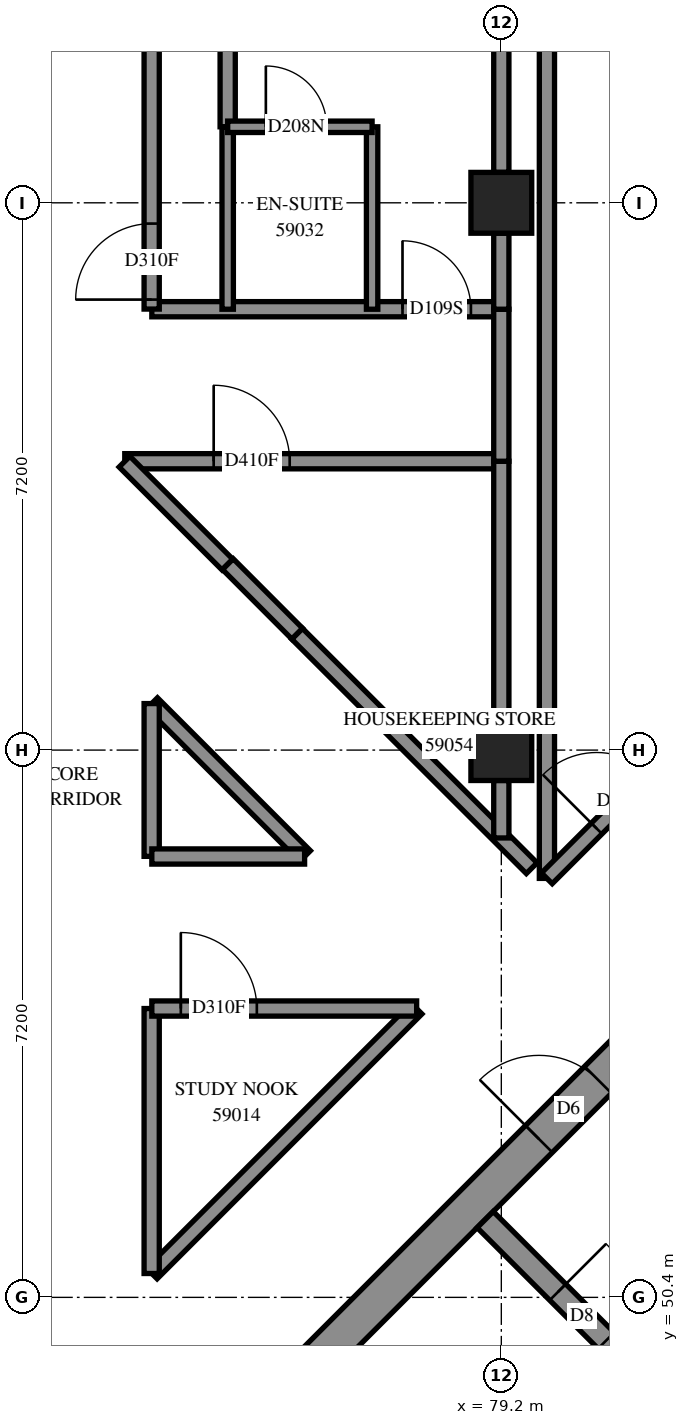
"""IFC4 building model, lengths in metres.
Left out: names, types, materials, properties, quantities, classifications, styles, units other than length and angle.
Written with IfcOpenShell. Run it as: python <this file> out.ifc"""

import sys

from ifc_helpers import new_model, si_unit, direction, frame, frame_2d, origin, origin_2d, place, context, subcontext, project, spatial, rectangle, extrude, element, fill, save


model = new_model("IFC4")
c1 = context("Model", 3, precision=1e-05, world=origin(), true_north=direction((0.0, 1.0)))
c2 = subcontext(c1, "Body", "Model", "MODEL_VIEW")
j1 = project(units=[si_unit("LENGTHUNIT", "METRE"), si_unit("PLANEANGLEUNIT", "RADIAN")], contexts=[c1])
p1 = place(None, origin())
s1 = spatial("IfcSite", under=j1, at=p1, CompositionType="ELEMENT")
p2 = place(p1, origin())
s2 = spatial("IfcBuilding", under=s1, at=p2, CompositionType="ELEMENT")
p3 = place(p2, frame((0.0, 0.0, 216.8)))
s3 = spatial("IfcBuildingStorey", under=s2, at=p3, CompositionType="ELEMENT", Elevation=216.8)
for number, where, z_axis, x_axis in (
    (1, (79.2, 57.6, 0.0), (0.0, 0.0, 1.0), (1.0, 0.0, 0.0)),
    (2, (79.2, 64.8, 0.0), (0.0, 0.0, 1.0), (1.0, 0.0, 0.0)),
):
    element("IfcColumn", number, at=place(p3, frame(where, z_axis=z_axis, x_axis=x_axis)), inside=s3, PredefinedType="COLUMN", context=c2, shape_type="SweptSolid", body=[
        extrude(rectangle(XDim=0.8, YDim=0.8, at=origin_2d()), origin(), (0.0, 0.0, 1.0), 3.1),
    ])
p4 = place(p3, frame((76.478, 49.267, -0.3), z_axis=(0.0, 0.0, 1.0), x_axis=(0.7071067812, 0.7071067812, 0.0)))
e3 = element("IfcWall", 3, at=p4, inside=s3, PredefinedType="SHEAR", context=c2, shape_type="SweptSolid", body=[
    extrude(rectangle(XDim=14.4, YDim=0.5, at=frame_2d((7.2, 0.0))), origin(), (0.0, 0.0, 1.0), 2.7),
])
p5 = place(p4, frame((4.55, 0.0, 0.3)))
e4 = element("IfcOpeningElement", 4, at=p5, cuts=e3, PredefinedType="OPENING", context=c2, shape_type="SweptSolid", body=[
    extrude(rectangle(XDim=1.1, YDim=2.1, at=frame_2d((0.55, 1.05))), frame((0.0, 0.26, 0.0), z_axis=(0.0, -1.0, 0.0), x_axis=(1.0, 0.0, 0.0)), (0.0, 0.0, 1.0), 0.52),
])
p6 = place(p4, frame((11.35, 0.0, 0.3)))
e5 = element("IfcOpeningElement", 5, at=p6, cuts=e3, PredefinedType="OPENING", context=c2, shape_type="SweptSolid", body=[
    extrude(rectangle(XDim=1.1, YDim=2.1, at=frame_2d((0.55, 1.05))), frame((0.0, 0.26, 0.0), z_axis=(0.0, -1.0, 0.0), x_axis=(1.0, 0.0, 0.0)), (0.0, 0.0, 1.0), 0.52),
])
p7 = place(p3, frame((78.988, 51.423, 0.0), z_axis=(0.0, 0.0, 1.0), x_axis=(0.7071067812, -0.7071067812, 0.0)))
e6 = element("IfcWall", 6, at=p7, inside=s3, PredefinedType="SOLIDWALL", context=c2, shape_type="SweptSolid", body=[
    extrude(rectangle(XDim=14.4, YDim=0.3, at=frame_2d((7.2, 0.0))), origin(), (0.0, 0.0, 1.0), 3.1),
])
p8 = place(p7, frame((1.35, 0.0, 0.0)))
e7 = element("IfcOpeningElement", 7, at=p8, cuts=e6, PredefinedType="OPENING", context=c2, shape_type="SweptSolid", body=[
    extrude(rectangle(XDim=0.9, YDim=2.1, at=frame_2d((0.45, 1.05))), frame((0.0, 0.16, 0.0), z_axis=(0.0, -1.0, 0.0), x_axis=(1.0, 0.0, 0.0)), (0.0, 0.0, 1.0), 0.32),
])
p9 = place(p7, frame((4.95, 0.0, 0.0)))
e8 = element("IfcOpeningElement", 8, at=p9, cuts=e6, PredefinedType="OPENING", context=c2, shape_type="SweptSolid", body=[
    extrude(rectangle(XDim=0.9, YDim=2.1, at=frame_2d((0.45, 1.05))), frame((0.0, 0.16, 0.0), z_axis=(0.0, -1.0, 0.0), x_axis=(1.0, 0.0, 0.0)), (0.0, 0.0, 1.0), 0.32),
])
p10 = place(p7, frame((8.55, 0.0, 0.0)))
e9 = element("IfcOpeningElement", 9, at=p10, cuts=e6, PredefinedType="OPENING", context=c2, shape_type="SweptSolid", body=[
    extrude(rectangle(XDim=0.9, YDim=2.1, at=frame_2d((0.45, 1.05))), frame((0.0, 0.16, 0.0), z_axis=(0.0, -1.0, 0.0), x_axis=(1.0, 0.0, 0.0)), (0.0, 0.0, 1.0), 0.32),
])
p11 = place(p7, frame((12.05, 0.0, 0.0)))
e10 = element("IfcOpeningElement", 10, at=p11, cuts=e6, PredefinedType="OPENING", context=c2, shape_type="SweptSolid", body=[
    extrude(rectangle(XDim=1.1, YDim=2.1, at=frame_2d((0.55, 1.05))), frame((0.0, 0.16, 0.0), z_axis=(0.0, -1.0, 0.0), x_axis=(1.0, 0.0, 0.0)), (0.0, 0.0, 1.0), 0.32),
])
p12 = place(p3, frame((79.8, 55.912, 0.0), z_axis=(0.0, 0.0, 1.0), x_axis=(0.0, 1.0, 0.0)))
e11 = element("IfcWall", 11, at=p12, inside=s3, PredefinedType="PARTITIONING", context=c2, shape_type="SweptSolid", body=[
    extrude(rectangle(XDim=11.596, YDim=0.2, at=frame_2d((5.798, 0.0))), origin(), (0.0, 0.0, 1.0), 3.1),
])
p13 = place(p3, frame((79.799, 55.913, 0.0), z_axis=(0.0, 0.0, 1.0), x_axis=(0.7071067812, 0.7071067812, 0.0)))
e12 = element("IfcWall", 12, at=p13, inside=s3, PredefinedType="PARTITIONING", context=c2, shape_type="SweptSolid", body=[
    extrude(rectangle(XDim=9.95, YDim=0.2, at=frame_2d((4.975, 0.0))), origin(), (0.0, 0.0, 1.0), 3.1),
])
p14 = place(p13, frame((0.927, 0.0, 0.0)))
e13 = element("IfcOpeningElement", 13, at=p14, cuts=e12, PredefinedType="OPENING", context=c2, shape_type="SweptSolid", body=[
    extrude(rectangle(XDim=1.0, YDim=2.1, at=frame_2d((0.5, 1.05))), frame((0.0, 0.11, 0.0), z_axis=(0.0, -1.0, 0.0), x_axis=(1.0, 0.0, 0.0)), (0.0, 0.0, 1.0), 0.22),
])
p15 = place(p3, frame((75.6, 65.8, 0.0), z_axis=(0.0, 0.0, 1.0), x_axis=(0.0, 1.0, 0.0)))
e14 = element("IfcWall", 14, at=p15, inside=s3, PredefinedType="PARTITIONING", context=c2, shape_type="SweptSolid", body=[
    extrude(rectangle(XDim=6.999, YDim=0.2, at=frame_2d((3.499, 0.0))), origin(), (0.0, 0.0, 1.0), 3.1),
])
p16 = place(p3, frame((79.2, 65.2, 0.0), z_axis=(0.0, 0.0, 1.0), x_axis=(0.0, 1.0, 0.0)))
e15 = element("IfcWall", 15, at=p16, inside=s3, PredefinedType="PARTITIONING", context=c2, shape_type="SweptSolid", body=[
    extrude(rectangle(XDim=6.4, YDim=0.2, at=frame_2d((3.2, 0.0))), origin(), (0.0, 0.0, 1.0), 3.1),
])
p17 = place(p3, frame((74.246, 61.4, 0.0), z_axis=(0.0, 0.0, 1.0), x_axis=(1.0, 0.0, 0.0)))
e16 = element("IfcWall", 16, at=p17, inside=s3, PredefinedType="PARTITIONING", context=c2, shape_type="SweptSolid", body=[
    extrude(rectangle(XDim=4.954, YDim=0.2, at=frame_2d((2.477, 0.0))), origin(), (0.0, 0.0, 1.0), 3.1),
])
p18 = place(p17, frame((1.17, 0.0, 0.0)))
e17 = element("IfcOpeningElement", 17, at=p18, cuts=e16, PredefinedType="OPENING", context=c2, shape_type="SweptSolid", body=[
    extrude(rectangle(XDim=1.0, YDim=2.1, at=frame_2d((0.5, 1.05))), frame((0.0, 0.11, 0.0), z_axis=(0.0, -1.0, 0.0), x_axis=(1.0, 0.0, 0.0)), (0.0, 0.0, 1.0), 0.22),
])
p19 = place(p3, frame((74.601, 50.715, 0.0), z_axis=(0.0, 0.0, 1.0), x_axis=(0.7071067812, 0.7071067812, 0.0)))
e18 = element("IfcWall", 18, at=p19, inside=s3, PredefinedType="PARTITIONING", context=c2, shape_type="SweptSolid", body=[
    extrude(rectangle(XDim=4.927, YDim=0.2, at=frame_2d((2.464, 0.0))), origin(), (0.0, 0.0, 1.0), 3.1),
])
p20 = place(p3, frame((74.602, 63.4, 0.0), z_axis=(0.0, 0.0, 1.0), x_axis=(1.0, 0.0, 0.0)))
e19 = element("IfcWall", 19, at=p20, inside=s3, PredefinedType="PARTITIONING", context=c2, shape_type="SweptSolid", body=[
    extrude(rectangle(XDim=4.598, YDim=0.2, at=frame_2d((2.299, 0.0))), origin(), (0.0, 0.0, 1.0), 3.1),
])
p21 = place(p20, frame((3.298, 0.0, 0.0)))
e20 = element("IfcOpeningElement", 20, at=p21, cuts=e19, PredefinedType="OPENING", context=c2, shape_type="SweptSolid", body=[
    extrude(rectangle(XDim=0.9, YDim=2.1, at=frame_2d((0.45, 1.05))), frame((0.0, 0.11, 0.0), z_axis=(0.0, -1.0, 0.0), x_axis=(1.0, 0.0, 0.0)), (0.0, 0.0, 1.0), 0.22),
])
p22 = place(p3, frame((76.513, 59.131, 0.0), z_axis=(0.0, 0.0, 1.0), x_axis=(0.7073587997, -0.7068546728, 0.0)))
e21 = element("IfcWall", 21, at=p22, inside=s3, PredefinedType="PARTITIONING", context=c2, shape_type="SweptSolid", body=[
    extrude(rectangle(XDim=4.364, YDim=0.2, at=frame_2d((2.182, 0.0))), origin(), (0.0, 0.0, 1.0), 3.1),
])
p23 = place(p3, frame((74.6, 63.402, 0.0), z_axis=(0.0, 0.0, 1.0), x_axis=(0.0, 1.0, 0.0)))
e22 = element("IfcWall", 22, at=p23, inside=s3, PredefinedType="PARTITIONING", context=c2, shape_type="SweptSolid", body=[
    extrude(rectangle(XDim=3.998, YDim=0.2, at=frame_2d((1.999, 0.0))), origin(), (0.0, 0.0, 1.0), 3.1),
])
p24 = place(p23, frame((0.125, 0.0, 0.0)))
e23 = element("IfcOpeningElement", 23, at=p24, cuts=e22, PredefinedType="OPENING", context=c2, shape_type="SweptSolid", body=[
    extrude(rectangle(XDim=1.0, YDim=2.1, at=frame_2d((0.5, 1.05))), frame((0.0, 0.11, 0.0), z_axis=(0.0, -1.0, 0.0), x_axis=(1.0, 0.0, 0.0)), (0.0, 0.0, 1.0), 0.22),
])
p25 = place(p3, frame((74.6, 50.714, 0.0), z_axis=(0.0, 0.0, 1.0), x_axis=(0.0, 1.0, 0.0)))
e24 = element("IfcWall", 24, at=p25, inside=s3, PredefinedType="PARTITIONING", context=c2, shape_type="SweptSolid", body=[
    extrude(rectangle(XDim=3.486, YDim=0.2, at=frame_2d((1.743, 0.0))), origin(), (0.0, 0.0, 1.0), 3.1),
])
p26 = place(p3, frame((74.602, 54.2, 0.0), z_axis=(0.0, 0.0, 1.0), x_axis=(1.0, 0.0, 0.0)))
e25 = element("IfcWall", 25, at=p26, inside=s3, PredefinedType="PARTITIONING", context=c2, shape_type="SweptSolid", body=[
    extrude(rectangle(XDim=3.484, YDim=0.2, at=frame_2d((1.742, 0.0))), origin(), (0.0, 0.0, 1.0), 3.1),
])
p27 = place(p26, frame((0.382, 0.0, 0.0)))
e26 = element("IfcOpeningElement", 26, at=p27, cuts=e25, PredefinedType="OPENING", context=c2, shape_type="SweptSolid", body=[
    extrude(rectangle(XDim=1.0, YDim=2.1, at=frame_2d((0.5, 1.05))), frame((0.0, 0.11, 0.0), z_axis=(0.0, -1.0, 0.0), x_axis=(1.0, 0.0, 0.0)), (0.0, 0.0, 1.0), 0.22),
])
p28 = place(p3, frame((79.2, 58.0, 0.0), z_axis=(0.0, 0.0, 1.0), x_axis=(0.0, 1.0, 0.0)))
e27 = element("IfcWall", 27, at=p28, inside=s3, PredefinedType="PARTITIONING", context=c2, shape_type="SweptSolid", body=[
    extrude(rectangle(XDim=3.4, YDim=0.2, at=frame_2d((1.7, 0.0))), origin(), (0.0, 0.0, 1.0), 3.1),
])
p29 = place(p3, frame((74.606, 58.218, 0.0), z_axis=(0.0, 0.0, 1.0), x_axis=(0.7071067812, -0.7071067812, 0.0)))
e28 = element("IfcWall", 28, at=p29, inside=s3, PredefinedType="PARTITIONING", context=c2, shape_type="SweptSolid", body=[
    extrude(rectangle(XDim=2.845, YDim=0.2, at=frame_2d((1.423, 0.0))), origin(), (0.0, 0.0, 1.0), 3.1),
])
for number, where, z_axis, x_axis in (
    (29, (75.6, 63.4, 0.0), (0.0, 0.0, 1.0), (0.0, 1.0, 0.0)),
    (30, (77.5, 63.4, 0.0), (0.0, 0.0, 1.0), (0.0, 1.0, 0.0)),
):
    element("IfcWall", number, at=place(p3, frame(where, z_axis=z_axis, x_axis=x_axis)), inside=s3, PredefinedType="PARTITIONING", context=c2, shape_type="SweptSolid", body=[
        extrude(rectangle(XDim=2.4, YDim=0.15, at=frame_2d((1.2, 0.0))), origin(), (0.0, 0.0, 1.0), 3.1),
    ])
for number, where, z_axis, x_axis in (
    (31, (74.6, 56.202, 0.0), (0.0, 0.0, 1.0), (0.0, 1.0, 0.0)),
    (32, (74.602, 56.2, 0.0), (0.0, 0.0, 1.0), (1.0, 0.0, 0.0)),
):
    element("IfcWall", number, at=place(p3, frame(where, z_axis=z_axis, x_axis=x_axis)), inside=s3, PredefinedType="PARTITIONING", context=c2, shape_type="SweptSolid", body=[
        extrude(rectangle(XDim=2.01, YDim=0.2, at=frame_2d((1.005, 0.0))), origin(), (0.0, 0.0, 1.0), 3.1),
    ])
p30 = place(p3, frame((79.2, 61.4, 0.0), z_axis=(0.0, 0.0, 1.0), x_axis=(0.0, 1.0, 0.0)))
e33 = element("IfcWall", 33, at=p30, inside=s3, PredefinedType="PARTITIONING", context=c2, shape_type="SweptSolid", body=[
    extrude(rectangle(XDim=2.0, YDim=0.2, at=frame_2d((1.0, 0.0))), origin(), (0.0, 0.0, 1.0), 3.1),
])
p31 = place(p3, frame((74.243, 61.395, 0.0), z_axis=(0.0, 0.0, 1.0), x_axis=(0.7071067812, -0.7071067812, 0.0)))
e34 = element("IfcWall", 34, at=p31, inside=s3, PredefinedType="PARTITIONING", context=c2, shape_type="SweptSolid", body=[
    extrude(rectangle(XDim=1.915, YDim=0.2, at=frame_2d((0.957, 0.0))), origin(), (0.0, 0.0, 1.0), 3.1),
])
p32 = place(p3, frame((75.6, 65.8, 0.0), z_axis=(0.0, 0.0, 1.0), x_axis=(1.0, 0.0, 0.0)))
e35 = element("IfcWall", 35, at=p32, inside=s3, PredefinedType="PARTITIONING", context=c2, shape_type="SweptSolid", body=[
    extrude(rectangle(XDim=1.9, YDim=0.15, at=frame_2d((0.95, 0.0))), origin(), (0.0, 0.0, 1.0), 3.1),
])
p33 = place(p32, frame((0.502, 0.0, 0.0)))
e36 = element("IfcOpeningElement", 36, at=p33, cuts=e35, PredefinedType="OPENING", context=c2, shape_type="SweptSolid", body=[
    extrude(rectangle(XDim=0.8, YDim=2.1, at=frame_2d((0.4, 1.05))), frame((0.0, 0.085, 0.0), z_axis=(0.0, -1.0, 0.0), x_axis=(1.0, 0.0, 0.0)), (0.0, 0.0, 1.0), 0.17),
])
p34 = place(p3, frame((75.602, 60.046, 0.0), z_axis=(0.0, 0.0, 1.0), x_axis=(0.7063318703, -0.7078808437, 0.0)))
e37 = element("IfcWall", 37, at=p34, inside=s3, PredefinedType="PARTITIONING", context=c2, shape_type="SweptSolid", body=[
    extrude(rectangle(XDim=1.291, YDim=0.2, at=frame_2d((0.646, 0.0))), origin(), (0.0, 0.0, 1.0), 3.1),
])
p35 = place(p3, frame((79.2, 63.4, 0.0), z_axis=(0.0, 0.0, 1.0), x_axis=(0.0, 1.0, 0.0)))
e38 = element("IfcWall", 38, at=p35, inside=s3, PredefinedType="PARTITIONING", context=c2, shape_type="SweptSolid", body=[
    extrude(rectangle(XDim=1.0, YDim=0.2, at=frame_2d((0.5, 0.0))), origin(), (0.0, 0.0, 1.0), 3.1),
])
p36 = place(p3, frame((79.2, 56.444, 0.0), z_axis=(0.0, 0.0, 1.0), x_axis=(0.0, 1.0, 0.0)))
e39 = element("IfcWall", 39, at=p36, inside=s3, PredefinedType="PARTITIONING", context=c2, shape_type="SweptSolid", body=[
    extrude(rectangle(XDim=0.756, YDim=0.2, at=frame_2d((0.378, 0.0))), origin(), (0.0, 0.0, 1.0), 3.1),
])
p37 = place(p5, origin())
e40 = element("IfcDoor", 40, at=p37, inside=s3, OperationType="DOUBLE_DOOR_SINGLE_SWING", PredefinedType="DOOR", context=c2, shape_type="SweptSolid", body=[
    extrude(rectangle(XDim=1.1, YDim=2.1, at=frame_2d((0.55, 1.05))), frame((0.0, 0.025, 0.0), z_axis=(0.0, -1.0, 0.0), x_axis=(1.0, 0.0, 0.0)), (0.0, 0.0, 1.0), 0.05),
])
fill(e4, e40)
p38 = place(p8, origin())
e41 = element("IfcDoor", 41, at=p38, inside=s3, OperationType="SINGLE_SWING_LEFT", PredefinedType="DOOR", context=c2, shape_type="SweptSolid", body=[
    extrude(rectangle(XDim=0.9, YDim=2.1, at=frame_2d((0.45, 1.05))), frame((0.0, 0.025, 0.0), z_axis=(0.0, -1.0, 0.0), x_axis=(1.0, 0.0, 0.0)), (0.0, 0.0, 1.0), 0.05),
])
fill(e7, e41)
p39 = place(p27, origin())
e42 = element("IfcDoor", 42, at=p39, inside=s3, OperationType="SINGLE_SWING_RIGHT", PredefinedType="DOOR", context=c2, shape_type="SweptSolid", body=[
    extrude(rectangle(XDim=1.0, YDim=2.1, at=frame_2d((0.5, 1.05))), frame((0.0, 0.025, 0.0), z_axis=(0.0, -1.0, 0.0), x_axis=(1.0, 0.0, 0.0)), (0.0, 0.0, 1.0), 0.05),
])
fill(e26, e42)
p40 = place(p24, origin())
e43 = element("IfcDoor", 43, at=p40, inside=s3, OperationType="SINGLE_SWING_RIGHT", PredefinedType="DOOR", context=c2, shape_type="SweptSolid", body=[
    extrude(rectangle(XDim=1.0, YDim=2.1, at=frame_2d((0.5, 1.05))), frame((0.0, 0.025, 0.0), z_axis=(0.0, -1.0, 0.0), x_axis=(1.0, 0.0, 0.0)), (0.0, 0.0, 1.0), 0.05),
])
fill(e23, e43)
p41 = place(p21, origin())
e44 = element("IfcDoor", 44, at=p41, inside=s3, OperationType="SINGLE_SWING_LEFT", PredefinedType="DOOR", context=c2, shape_type="SweptSolid", body=[
    extrude(rectangle(XDim=0.9, YDim=2.1, at=frame_2d((0.45, 1.05))), frame((0.0, 0.025, 0.0), z_axis=(0.0, -1.0, 0.0), x_axis=(1.0, 0.0, 0.0)), (0.0, 0.0, 1.0), 0.05),
])
fill(e20, e44)
p42 = place(p33, origin())
e45 = element("IfcDoor", 45, at=p42, inside=s3, OperationType="SINGLE_SWING_RIGHT", PredefinedType="DOOR", context=c2, shape_type="SweptSolid", body=[
    extrude(rectangle(XDim=0.8, YDim=2.1, at=frame_2d((0.4, 1.05))), frame((0.0, 0.025, 0.0), z_axis=(0.0, -1.0, 0.0), x_axis=(1.0, 0.0, 0.0)), (0.0, 0.0, 1.0), 0.05),
])
fill(e36, e45)
p43 = place(p18, origin())
e46 = element("IfcDoor", 46, at=p43, inside=s3, OperationType="SINGLE_SWING_RIGHT", PredefinedType="DOOR", context=c2, shape_type="SweptSolid", body=[
    extrude(rectangle(XDim=1.0, YDim=2.1, at=frame_2d((0.5, 1.05))), frame((0.0, 0.025, 0.0), z_axis=(0.0, -1.0, 0.0), x_axis=(1.0, 0.0, 0.0)), (0.0, 0.0, 1.0), 0.05),
])
fill(e17, e46)
p44 = place(p14, origin())
e47 = element("IfcDoor", 47, at=p44, inside=s3, OperationType="SINGLE_SWING_RIGHT", PredefinedType="DOOR", context=c2, shape_type="SweptSolid", body=[
    extrude(rectangle(XDim=1.0, YDim=2.1, at=frame_2d((0.5, 1.05))), frame((0.0, 0.025, 0.0), z_axis=(0.0, -1.0, 0.0), x_axis=(1.0, 0.0, 0.0)), (0.0, 0.0, 1.0), 0.05),
])
fill(e13, e47)
save(model, sys.argv[1])
